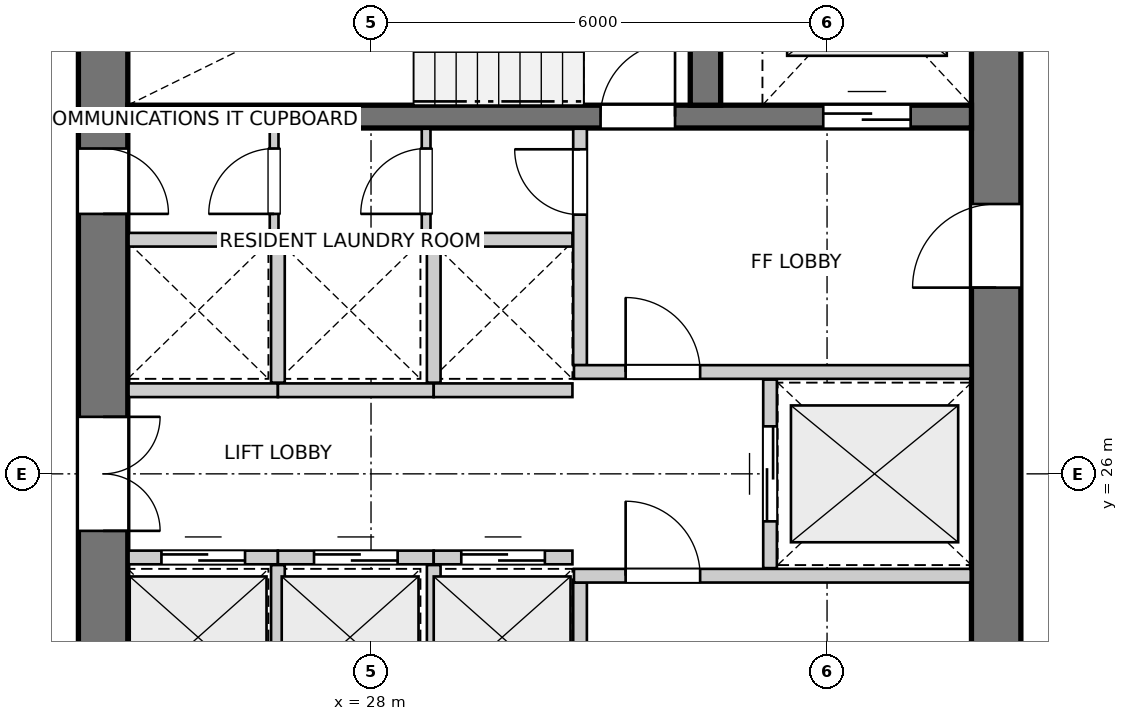
"""IFC4 building model, lengths in metres.
Left out: names, types, materials, properties, quantities, classifications, styles, units other than length and angle.
Written with IfcOpenShell. Run it as: python <this file> out.ifc"""

import sys

from ifc_helpers import new_model, si_unit, direction, frame, frame_2d, origin, place, context, subcontext, project, spatial, rectangle, extrude, source, transform, mapped, element, fill, save


model = new_model("IFC4")
c1 = context("Model", 3, precision=1e-05, world=origin(), true_north=direction((0.0, 1.0)))
c2 = subcontext(c1, "Body", "Model", "MODEL_VIEW")
j1 = project(units=[si_unit("LENGTHUNIT", "METRE"), si_unit("PLANEANGLEUNIT", "RADIAN")], contexts=[c1])
p1 = place(None, origin())
s1 = spatial("IfcSite", under=j1, at=p1, CompositionType="ELEMENT")
p2 = place(p1, origin())
s2 = spatial("IfcBuilding", under=s1, at=p2, CompositionType="ELEMENT")
p3 = place(p2, frame((0.0, 0.0, 89.6)))
s3 = spatial("IfcBuildingStorey", under=s2, at=p3, CompositionType="ELEMENT", Elevation=89.6)
p4 = place(p3, frame((24.475, 33.8, 0.0), z_axis=(0.0, 0.0, 1.0), x_axis=(0.0, -1.0, 0.0)))
e1 = element("IfcWall", 1, at=p4, inside=s3, PredefinedType="SHEAR", context=c2, shape_type="SweptSolid", body=[
    extrude(rectangle(XDim=15.6, YDim=0.65, at=frame_2d((7.8, 0.0))), origin(), (0.0, 0.0, 1.0), 2.95),
])
p5 = place(p4, frame((7.05, 0.0, 0.0)))
e2 = element("IfcOpeningElement", 2, at=p5, cuts=e1, PredefinedType="OPENING", context=c2, shape_type="SweptSolid", body=[
    extrude(rectangle(XDim=1.5, YDim=2.15, at=frame_2d((0.75, 1.075))), frame((0.0, 0.335, 0.0), z_axis=(0.0, -1.0, 0.0), x_axis=(1.0, 0.0, 0.0)), (0.0, 0.0, 1.0), 0.67),
])
p6 = place(p4, frame((3.52, 0.0, 0.0)))
e3 = element("IfcOpeningElement", 3, at=p6, cuts=e1, PredefinedType="OPENING", context=c2, shape_type="SweptSolid", body=[
    extrude(rectangle(XDim=0.86, YDim=2.05, at=frame_2d((0.43, 1.025))), frame((0.0, 0.335, 0.0), z_axis=(0.0, -1.0, 0.0), x_axis=(1.0, 0.0, 0.0)), (0.0, 0.0, 1.0), 0.67),
])
p7 = place(p4, frame((11.22, 0.0, 0.0)))
e4 = element("IfcOpeningElement", 4, at=p7, cuts=e1, PredefinedType="OPENING", context=c2, shape_type="SweptSolid", body=[
    extrude(rectangle(XDim=0.86, YDim=2.05, at=frame_2d((0.43, 1.025))), frame((0.0, 0.335, 0.0), z_axis=(0.0, -1.0, 0.0), x_axis=(1.0, 0.0, 0.0)), (0.0, 0.0, 1.0), 0.67),
])
p8 = place(p3, frame((36.225, 18.2, 0.0), z_axis=(0.0, 0.0, 1.0), x_axis=(0.0, 1.0, 0.0)))
e5 = element("IfcWall", 5, at=p8, inside=s3, PredefinedType="SHEAR", context=c2, shape_type="SweptSolid", body=[
    extrude(rectangle(XDim=15.6, YDim=0.65, at=frame_2d((7.8, 0.0))), origin(), (0.0, 0.0, 1.0), 2.95),
])
p9 = place(p8, frame((4.25, 0.0, 0.0)))
e6 = element("IfcOpeningElement", 6, at=p9, cuts=e5, PredefinedType="OPENING", context=c2, shape_type="SweptSolid", body=[
    extrude(rectangle(XDim=1.1, YDim=2.15, at=frame_2d((0.55, 1.075))), frame((0.0, 0.335, 0.0), z_axis=(0.0, -1.0, 0.0), x_axis=(1.0, 0.0, 0.0)), (0.0, 0.0, 1.0), 0.67),
])
p10 = place(p8, frame((10.25, 0.0, 0.0)))
e7 = element("IfcOpeningElement", 7, at=p10, cuts=e5, PredefinedType="OPENING", context=c2, shape_type="SweptSolid", body=[
    extrude(rectangle(XDim=1.1, YDim=2.15, at=frame_2d((0.55, 1.075))), frame((0.0, 0.335, 0.0), z_axis=(0.0, -1.0, 0.0), x_axis=(1.0, 0.0, 0.0)), (0.0, 0.0, 1.0), 0.67),
])
p11 = place(p3, frame((24.8, 30.7, 0.0), z_axis=(0.0, 0.0, 1.0), x_axis=(1.0, 0.0, 0.0)))
e8 = element("IfcWall", 8, at=p11, inside=s3, PredefinedType="SHEAR", context=c2, shape_type="SweptSolid", body=[
    extrude(rectangle(XDim=11.1, YDim=0.3, at=frame_2d((5.55, 0.0))), origin(), (0.0, 0.0, 1.0), 2.95),
])
p12 = place(p11, frame((6.22, 0.0, 0.0)))
e9 = element("IfcOpeningElement", 9, at=p12, cuts=e8, PredefinedType="OPENING", context=c2, shape_type="SweptSolid", body=[
    extrude(rectangle(XDim=0.98, YDim=2.15, at=frame_2d((0.49, 1.075))), frame((0.0, 0.16, 0.0), z_axis=(0.0, -1.0, 0.0), x_axis=(1.0, 0.0, 0.0)), (0.0, 0.0, 1.0), 0.32),
])
p13 = place(p11, frame((9.15, 0.0, 0.0)))
e10 = element("IfcOpeningElement", 10, at=p13, cuts=e8, PredefinedType="OPENING", context=c2, shape_type="SweptSolid", body=[
    extrude(rectangle(XDim=1.15, YDim=2.15, at=frame_2d((0.575, 1.075))), frame((0.0, 0.16, 0.0), z_axis=(0.0, -1.0, 0.0), x_axis=(1.0, 0.0, 0.0)), (0.0, 0.0, 1.0), 0.32),
])
p14 = place(p3, frame((32.4, 30.85, 0.0), z_axis=(0.0, 0.0, 1.0), x_axis=(0.0, 1.0, 0.0)))
e11 = element("IfcWall", 11, at=p14, inside=s3, PredefinedType="SHEAR", context=c2, shape_type="SweptSolid", body=[
    extrude(rectangle(XDim=2.95, YDim=0.4, at=frame_2d((1.475, 0.0))), origin(), (0.0, 0.0, 1.0), 2.95),
])
p15 = place(p3, frame((30.75, 21.46, 0.0), z_axis=(0.0, 0.0, 1.0), x_axis=(0.0, 1.0, 0.0)))
e12 = element("IfcWall", 12, at=p15, inside=s3, PredefinedType="PARTITIONING", context=c2, shape_type="SweptSolid", body=[
    extrude(rectangle(XDim=3.11, YDim=0.18, at=frame_2d((1.555, 0.0))), origin(), (0.0, 0.0, 1.0), 2.95),
])
p16 = place(p15, frame((0.26, 0.0, 0.0)))
e13 = element("IfcOpeningElement", 13, at=p16, cuts=e12, PredefinedType="OPENING", context=c2, shape_type="SweptSolid", body=[
    extrude(rectangle(XDim=0.86, YDim=2.05, at=frame_2d((0.43, 1.025))), frame((0.0, 0.1, 0.0), z_axis=(0.0, -1.0, 0.0), x_axis=(1.0, 0.0, 0.0)), (0.0, 0.0, 1.0), 0.2),
])
p17 = place(p3, frame((30.67, 24.66, 0.0), z_axis=(0.0, 0.0, 1.0), x_axis=(1.0, 0.0, 0.0)))
e14 = element("IfcWall", 14, at=p17, inside=s3, PredefinedType="PARTITIONING", context=c2, shape_type="SweptSolid", body=[
    extrude(rectangle(XDim=5.22, YDim=0.18, at=frame_2d((2.61, 0.0))), origin(), (0.0, 0.0, 1.0), 2.95),
])
p18 = place(p17, frame((0.68, 0.0, 0.0)))
e15 = element("IfcOpeningElement", 15, at=p18, cuts=e14, PredefinedType="OPENING", context=c2, shape_type="SweptSolid", body=[
    extrude(rectangle(XDim=0.98, YDim=2.15, at=frame_2d((0.49, 1.075))), frame((0.0, 0.1, 0.0), z_axis=(0.0, -1.0, 0.0), x_axis=(1.0, 0.0, 0.0)), (0.0, 0.0, 1.0), 0.2),
])
p19 = place(p3, frame((30.75, 27.43, 0.0), z_axis=(0.0, 0.0, 1.0), x_axis=(0.0, 1.0, 0.0)))
e16 = element("IfcWall", 16, at=p19, inside=s3, PredefinedType="PARTITIONING", context=c2, shape_type="SweptSolid", body=[
    extrude(rectangle(XDim=3.11, YDim=0.18, at=frame_2d((1.555, 0.0))), origin(), (0.0, 0.0, 1.0), 2.95),
])
p20 = place(p19, frame((1.98, 0.0, 0.0)))
e17 = element("IfcOpeningElement", 17, at=p20, cuts=e16, PredefinedType="OPENING", context=c2, shape_type="SweptSolid", body=[
    extrude(rectangle(XDim=0.86, YDim=2.05, at=frame_2d((0.43, 1.025))), frame((0.0, 0.1, 0.0), z_axis=(0.0, -1.0, 0.0), x_axis=(1.0, 0.0, 0.0)), (0.0, 0.0, 1.0), 0.2),
])
p21 = place(p3, frame((30.67, 27.34, 0.0), z_axis=(0.0, 0.0, 1.0), x_axis=(1.0, 0.0, 0.0)))
e18 = element("IfcWall", 18, at=p21, inside=s3, PredefinedType="PARTITIONING", context=c2, shape_type="SweptSolid", body=[
    extrude(rectangle(XDim=5.22, YDim=0.18, at=frame_2d((2.61, 0.0))), origin(), (0.0, 0.0, 1.0), 2.95),
])
p22 = place(p21, frame((0.68, 0.0, 0.0)))
e19 = element("IfcOpeningElement", 19, at=p22, cuts=e18, PredefinedType="OPENING", context=c2, shape_type="SweptSolid", body=[
    extrude(rectangle(XDim=0.98, YDim=2.15, at=frame_2d((0.49, 1.075))), frame((0.0, 0.1, 0.0), z_axis=(0.0, -1.0, 0.0), x_axis=(1.0, 0.0, 0.0)), (0.0, 0.0, 1.0), 0.2),
])
p23 = place(p3, frame((33.25, 24.76, 0.0), z_axis=(0.0, 0.0, 1.0), x_axis=(0.0, 1.0, 0.0)))
e20 = element("IfcWall", 20, at=p23, inside=s3, PredefinedType="PARTITIONING", context=c2, shape_type="SweptSolid", body=[
    extrude(rectangle(XDim=2.48, YDim=0.18, at=frame_2d((1.24, 0.0))), origin(), (0.0, 0.0, 1.0), 2.95),
])
p24 = place(p23, frame((0.615, 0.0, 0.0)))
e21 = element("IfcOpeningElement", 21, at=p24, cuts=e20, PredefinedType="OPENING", context=c2, shape_type="SweptSolid", body=[
    extrude(rectangle(XDim=1.25, YDim=2.15, at=frame_2d((0.625, 1.075))), frame((0.0, 0.1, 0.0), z_axis=(0.0, -1.0, 0.0), x_axis=(1.0, 0.0, 0.0)), (0.0, 0.0, 1.0), 0.2),
])
p25 = place(p3, frame((24.81, 24.9, 0.0), z_axis=(0.0, 0.0, 1.0), x_axis=(1.0, 0.0, 0.0)))
e22 = element("IfcWall", 22, at=p25, inside=s3, PredefinedType="PARTITIONING", context=c2, shape_type="SweptSolid", body=[
    extrude(rectangle(XDim=1.965, YDim=0.18, at=frame_2d((0.982, 0.0))), origin(), (0.0, 0.0, 1.0), 2.95),
])
p26 = place(p25, frame((0.433, 0.0, 0.0)))
e23 = element("IfcOpeningElement", 23, at=p26, cuts=e22, PredefinedType="OPENING", context=c2, shape_type="SweptSolid", body=[
    extrude(rectangle(XDim=1.1, YDim=2.15, at=frame_2d((0.55, 1.075))), frame((0.0, 0.1, 0.0), z_axis=(0.0, -1.0, 0.0), x_axis=(1.0, 0.0, 0.0)), (0.0, 0.0, 1.0), 0.2),
])
p27 = place(p3, frame((26.775, 24.9, 0.0), z_axis=(0.0, 0.0, 1.0), x_axis=(1.0, 0.0, 0.0)))
e24 = element("IfcWall", 24, at=p27, inside=s3, PredefinedType="PARTITIONING", context=c2, shape_type="SweptSolid", body=[
    extrude(rectangle(XDim=2.05, YDim=0.18, at=frame_2d((1.025, 0.0))), origin(), (0.0, 0.0, 1.0), 2.95),
])
p28 = place(p27, frame((0.475, 0.0, 0.0)))
e25 = element("IfcOpeningElement", 25, at=p28, cuts=e24, PredefinedType="OPENING", context=c2, shape_type="SweptSolid", body=[
    extrude(rectangle(XDim=1.1, YDim=2.15, at=frame_2d((0.55, 1.075))), frame((0.0, 0.1, 0.0), z_axis=(0.0, -1.0, 0.0), x_axis=(1.0, 0.0, 0.0)), (0.0, 0.0, 1.0), 0.2),
])
p29 = place(p3, frame((26.775, 23.02, 0.0), z_axis=(0.0, 0.0, 1.0), x_axis=(0.0, 1.0, 0.0)))
e26 = element("IfcWall", 26, at=p29, inside=s3, PredefinedType="PARTITIONING", context=c2, shape_type="SweptSolid", body=[
    extrude(rectangle(XDim=1.78, YDim=0.18, at=frame_2d((0.89, 0.0))), origin(), (0.0, 0.0, 1.0), 2.95),
])
p30 = place(p3, frame((28.825, 24.9, 0.0), z_axis=(0.0, 0.0, 1.0), x_axis=(1.0, 0.0, 0.0)))
e27 = element("IfcWall", 27, at=p30, inside=s3, PredefinedType="PARTITIONING", context=c2, shape_type="SweptSolid", body=[
    extrude(rectangle(XDim=1.825, YDim=0.18, at=frame_2d((0.913, 0.0))), origin(), (0.0, 0.0, 1.0), 2.95),
])
p31 = place(p30, frame((0.363, 0.0, 0.0)))
e28 = element("IfcOpeningElement", 28, at=p31, cuts=e27, PredefinedType="OPENING", context=c2, shape_type="SweptSolid", body=[
    extrude(rectangle(XDim=1.1, YDim=2.15, at=frame_2d((0.55, 1.075))), frame((0.0, 0.1, 0.0), z_axis=(0.0, -1.0, 0.0), x_axis=(1.0, 0.0, 0.0)), (0.0, 0.0, 1.0), 0.2),
])
p32 = place(p3, frame((28.825, 23.02, 0.0), z_axis=(0.0, 0.0, 1.0), x_axis=(0.0, 1.0, 0.0)))
e29 = element("IfcWall", 29, at=p32, inside=s3, PredefinedType="PARTITIONING", context=c2, shape_type="SweptSolid", body=[
    extrude(rectangle(XDim=1.78, YDim=0.18, at=frame_2d((0.89, 0.0))), origin(), (0.0, 0.0, 1.0), 2.95),
])
p33 = place(p3, frame((24.81, 29.08, 0.0), z_axis=(0.0, 0.0, 1.0), x_axis=(1.0, 0.0, 0.0)))
e30 = element("IfcWall", 30, at=p33, inside=s3, PredefinedType="PARTITIONING", context=c2, shape_type="SweptSolid", body=[
    extrude(rectangle(XDim=5.84, YDim=0.18, at=frame_2d((2.92, 0.0))), origin(), (0.0, 0.0, 1.0), 2.95),
])
p34 = place(p3, frame((24.81, 27.1, 0.0), z_axis=(0.0, 0.0, 1.0), x_axis=(1.0, 0.0, 0.0)))
e31 = element("IfcWall", 31, at=p34, inside=s3, PredefinedType="PARTITIONING", context=c2, shape_type="SweptSolid", body=[
    extrude(rectangle(XDim=1.965, YDim=0.18, at=frame_2d((0.982, 0.0))), origin(), (0.0, 0.0, 1.0), 2.95),
])
p35 = place(p3, frame((26.775, 27.1, 0.0), z_axis=(0.0, 0.0, 1.0), x_axis=(1.0, 0.0, 0.0)))
e32 = element("IfcWall", 32, at=p35, inside=s3, PredefinedType="PARTITIONING", context=c2, shape_type="SweptSolid", body=[
    extrude(rectangle(XDim=2.05, YDim=0.18, at=frame_2d((1.025, 0.0))), origin(), (0.0, 0.0, 1.0), 2.95),
])
p36 = place(p3, frame((26.775, 27.2, 0.0), z_axis=(0.0, 0.0, 1.0), x_axis=(0.0, 1.0, 0.0)))
e33 = element("IfcWall", 33, at=p36, inside=s3, PredefinedType="PARTITIONING", context=c2, shape_type="SweptSolid", body=[
    extrude(rectangle(XDim=1.78, YDim=0.18, at=frame_2d((0.89, 0.0))), origin(), (0.0, 0.0, 1.0), 2.95),
])
p37 = place(p3, frame((28.825, 27.1, 0.0), z_axis=(0.0, 0.0, 1.0), x_axis=(1.0, 0.0, 0.0)))
e34 = element("IfcWall", 34, at=p37, inside=s3, PredefinedType="PARTITIONING", context=c2, shape_type="SweptSolid", body=[
    extrude(rectangle(XDim=1.825, YDim=0.18, at=frame_2d((0.913, 0.0))), origin(), (0.0, 0.0, 1.0), 2.95),
])
p38 = place(p3, frame((28.825, 27.2, 0.0), z_axis=(0.0, 0.0, 1.0), x_axis=(0.0, 1.0, 0.0)))
e35 = element("IfcWall", 35, at=p38, inside=s3, PredefinedType="PARTITIONING", context=c2, shape_type="SweptSolid", body=[
    extrude(rectangle(XDim=1.78, YDim=0.18, at=frame_2d((0.89, 0.0))), origin(), (0.0, 0.0, 1.0), 2.95),
])
p39 = place(p3, frame((26.725, 29.16, 0.0), z_axis=(0.0, 0.0, 1.0), x_axis=(0.0, 1.0, 0.0)))
e36 = element("IfcWall", 36, at=p39, inside=s3, PredefinedType="PARTITIONING", context=c2, shape_type="SweptSolid", body=[
    extrude(rectangle(XDim=1.38, YDim=0.115, at=frame_2d((0.69, 0.0))), origin(), (0.0, 0.0, 1.0), 2.95),
])
p40 = place(p39, frame((0.26, 0.0, 0.0)))
e37 = element("IfcOpeningElement", 37, at=p40, cuts=e36, PredefinedType="OPENING", context=c2, shape_type="SweptSolid", body=[
    extrude(rectangle(XDim=0.86, YDim=2.05, at=frame_2d((0.43, 1.025))), frame((0.0, 0.067, 0.0), z_axis=(0.0, -1.0, 0.0), x_axis=(1.0, 0.0, 0.0)), (0.0, 0.0, 1.0), 0.135),
])
p41 = place(p3, frame((28.725, 29.16, 0.0), z_axis=(0.0, 0.0, 1.0), x_axis=(0.0, 1.0, 0.0)))
e38 = element("IfcWall", 38, at=p41, inside=s3, PredefinedType="PARTITIONING", context=c2, shape_type="SweptSolid", body=[
    extrude(rectangle(XDim=1.38, YDim=0.115, at=frame_2d((0.69, 0.0))), origin(), (0.0, 0.0, 1.0), 2.95),
])
p42 = place(p41, frame((0.26, 0.0, 0.0)))
e39 = element("IfcOpeningElement", 39, at=p42, cuts=e38, PredefinedType="OPENING", context=c2, shape_type="SweptSolid", body=[
    extrude(rectangle(XDim=0.86, YDim=2.05, at=frame_2d((0.43, 1.025))), frame((0.0, 0.067, 0.0), z_axis=(0.0, -1.0, 0.0), x_axis=(1.0, 0.0, 0.0)), (0.0, 0.0, 1.0), 0.135),
])
m1 = source(origin(), c2, "Body", "SweptSolid", [
    extrude(rectangle(XDim=0.98, YDim=2.15, at=frame_2d((0.49, 1.075))), frame((0.0, 0.025, 0.0), z_axis=(0.0, -1.0, 0.0), x_axis=(1.0, 0.0, 0.0)), (0.0, 0.0, 1.0), 0.05),
])
p43 = place(p12, origin())
e40 = element("IfcDoor", 40, at=p43, inside=s3, OperationType="SINGLE_SWING_RIGHT", PredefinedType="DOOR", context=c2, shape_type="MappedRepresentation", body=[
    mapped(m1, transform((0.0, 0.0, 0.0), x_axis=(1.0, 0.0, 0.0), y_axis=(0.0, 1.0, 0.0), z_axis=(0.0, 0.0, 1.0), scale=1.0)),
])
fill(e9, e40)
m2 = source(origin(), c2, "Body", "SweptSolid", [
    extrude(rectangle(XDim=1.15, YDim=2.15, at=frame_2d((0.575, 1.075))), frame((0.0, 0.025, 0.0), z_axis=(0.0, -1.0, 0.0), x_axis=(1.0, 0.0, 0.0)), (0.0, 0.0, 1.0), 0.05),
])
p44 = place(p13, origin())
e41 = element("IfcDoor", 41, at=p44, inside=s3, OperationType="DOUBLE_DOOR_SLIDING", PredefinedType="DOOR", context=c2, shape_type="MappedRepresentation", body=[
    mapped(m2, transform((0.0, 0.0, 0.0), x_axis=(1.0, 0.0, 0.0), y_axis=(0.0, 1.0, 0.0), z_axis=(0.0, 0.0, 1.0), scale=1.0)),
])
fill(e10, e41)
m3 = source(origin(), c2, "Body", "SweptSolid", [
    extrude(rectangle(XDim=1.1, YDim=2.15, at=frame_2d((0.55, 1.075))), frame((0.0, 0.025, 0.0), z_axis=(0.0, -1.0, 0.0), x_axis=(1.0, 0.0, 0.0)), (0.0, 0.0, 1.0), 0.05),
])
p45 = place(p10, origin())
e42 = element("IfcDoor", 42, at=p45, inside=s3, OperationType="SINGLE_SWING_LEFT", PredefinedType="DOOR", context=c2, shape_type="MappedRepresentation", body=[
    mapped(m3, transform((0.0, 0.0, 0.0), x_axis=(1.0, 0.0, 0.0), y_axis=(0.0, 1.0, 0.0), z_axis=(0.0, 0.0, 1.0), scale=1.0)),
])
fill(e7, e42)
m4 = source(origin(), c2, "Body", "SweptSolid", [
    extrude(rectangle(XDim=1.5, YDim=2.15, at=frame_2d((0.75, 1.075))), frame((0.0, 0.025, 0.0), z_axis=(0.0, -1.0, 0.0), x_axis=(1.0, 0.0, 0.0)), (0.0, 0.0, 1.0), 0.05),
])
p46 = place(p5, origin())
e43 = element("IfcDoor", 43, at=p46, inside=s3, OperationType="DOUBLE_DOOR_SINGLE_SWING", PredefinedType="DOOR", context=c2, shape_type="MappedRepresentation", body=[
    mapped(m4, transform((0.0, 0.0, 0.0), x_axis=(1.0, 0.0, 0.0), y_axis=(0.0, 1.0, 0.0), z_axis=(0.0, 0.0, 1.0), scale=1.0)),
])
fill(e2, e43)
m5 = source(origin(), c2, "Body", "SweptSolid", [
    extrude(rectangle(XDim=0.86, YDim=2.05, at=frame_2d((0.43, 1.025))), frame((0.0, 0.025, 0.0), z_axis=(0.0, -1.0, 0.0), x_axis=(1.0, 0.0, 0.0)), (0.0, 0.0, 1.0), 0.05),
])
p47 = place(p6, origin())
e44 = element("IfcDoor", 44, at=p47, inside=s3, OperationType="SINGLE_SWING_RIGHT", PredefinedType="DOOR", context=c2, shape_type="MappedRepresentation", body=[
    mapped(m5, transform((0.0, 0.0, 0.0), x_axis=(1.0, 0.0, 0.0), y_axis=(0.0, 1.0, 0.0), z_axis=(0.0, 0.0, 1.0), scale=1.0)),
])
fill(e3, e44)
p48 = place(p18, origin())
e45 = element("IfcDoor", 45, at=p48, inside=s3, OperationType="SINGLE_SWING_LEFT", PredefinedType="DOOR", context=c2, shape_type="MappedRepresentation", body=[
    mapped(m1, transform((0.0, 0.0, 0.0), x_axis=(1.0, 0.0, 0.0), y_axis=(0.0, 1.0, 0.0), z_axis=(0.0, 0.0, 1.0), scale=1.0)),
])
fill(e15, e45)
p49 = place(p20, origin())
e46 = element("IfcDoor", 46, at=p49, inside=s3, OperationType="SINGLE_SWING_RIGHT", PredefinedType="DOOR", context=c2, shape_type="MappedRepresentation", body=[
    mapped(m5, transform((0.0, 0.0, 0.0), x_axis=(1.0, 0.0, 0.0), y_axis=(0.0, 1.0, 0.0), z_axis=(0.0, 0.0, 1.0), scale=1.0)),
])
fill(e17, e46)
p50 = place(p22, origin())
e47 = element("IfcDoor", 47, at=p50, inside=s3, OperationType="SINGLE_SWING_LEFT", PredefinedType="DOOR", context=c2, shape_type="MappedRepresentation", body=[
    mapped(m1, transform((0.0, 0.0, 0.0), x_axis=(1.0, 0.0, 0.0), y_axis=(0.0, 1.0, 0.0), z_axis=(0.0, 0.0, 1.0), scale=1.0)),
])
fill(e19, e47)
m6 = source(origin(), c2, "Body", "SweptSolid", [
    extrude(rectangle(XDim=1.25, YDim=2.15, at=frame_2d((0.625, 1.075))), frame((0.0, 0.025, 0.0), z_axis=(0.0, -1.0, 0.0), x_axis=(1.0, 0.0, 0.0)), (0.0, 0.0, 1.0), 0.05),
])
p51 = place(p24, origin())
e48 = element("IfcDoor", 48, at=p51, inside=s3, OperationType="DOUBLE_DOOR_SLIDING", PredefinedType="DOOR", context=c2, shape_type="MappedRepresentation", body=[
    mapped(m6, transform((0.0, 0.0, 0.0), x_axis=(1.0, 0.0, 0.0), y_axis=(0.0, 1.0, 0.0), z_axis=(0.0, 0.0, 1.0), scale=1.0)),
])
fill(e21, e48)
p52 = place(p26, origin())
e49 = element("IfcDoor", 49, at=p52, inside=s3, OperationType="DOUBLE_DOOR_SLIDING", PredefinedType="DOOR", context=c2, shape_type="MappedRepresentation", body=[
    mapped(m3, transform((0.0, 0.0, 0.0), x_axis=(1.0, 0.0, 0.0), y_axis=(0.0, 1.0, 0.0), z_axis=(0.0, 0.0, 1.0), scale=1.0)),
])
fill(e23, e49)
p53 = place(p28, origin())
e50 = element("IfcDoor", 50, at=p53, inside=s3, OperationType="DOUBLE_DOOR_SLIDING", PredefinedType="DOOR", context=c2, shape_type="MappedRepresentation", body=[
    mapped(m3, transform((0.0, 0.0, 0.0), x_axis=(1.0, 0.0, 0.0), y_axis=(0.0, 1.0, 0.0), z_axis=(0.0, 0.0, 1.0), scale=1.0)),
])
fill(e25, e50)
p54 = place(p31, origin())
e51 = element("IfcDoor", 51, at=p54, inside=s3, OperationType="DOUBLE_DOOR_SLIDING", PredefinedType="DOOR", context=c2, shape_type="MappedRepresentation", body=[
    mapped(m3, transform((0.0, 0.0, 0.0), x_axis=(1.0, 0.0, 0.0), y_axis=(0.0, 1.0, 0.0), z_axis=(0.0, 0.0, 1.0), scale=1.0)),
])
fill(e28, e51)
p55 = place(p40, origin())
e52 = element("IfcDoor", 52, at=p55, inside=s3, OperationType="SINGLE_SWING_LEFT", PredefinedType="DOOR", context=c2, shape_type="MappedRepresentation", body=[
    mapped(m5, transform((0.0, 0.0, 0.0), x_axis=(1.0, 0.0, 0.0), y_axis=(0.0, 1.0, 0.0), z_axis=(0.0, 0.0, 1.0), scale=1.0)),
])
fill(e37, e52)
p56 = place(p42, origin())
e53 = element("IfcDoor", 53, at=p56, inside=s3, OperationType="SINGLE_SWING_LEFT", PredefinedType="DOOR", context=c2, shape_type="MappedRepresentation", body=[
    mapped(m5, transform((0.0, 0.0, 0.0), x_axis=(1.0, 0.0, 0.0), y_axis=(0.0, 1.0, 0.0), z_axis=(0.0, 0.0, 1.0), scale=1.0)),
])
fill(e39, e53)
save(model, sys.argv[1])
